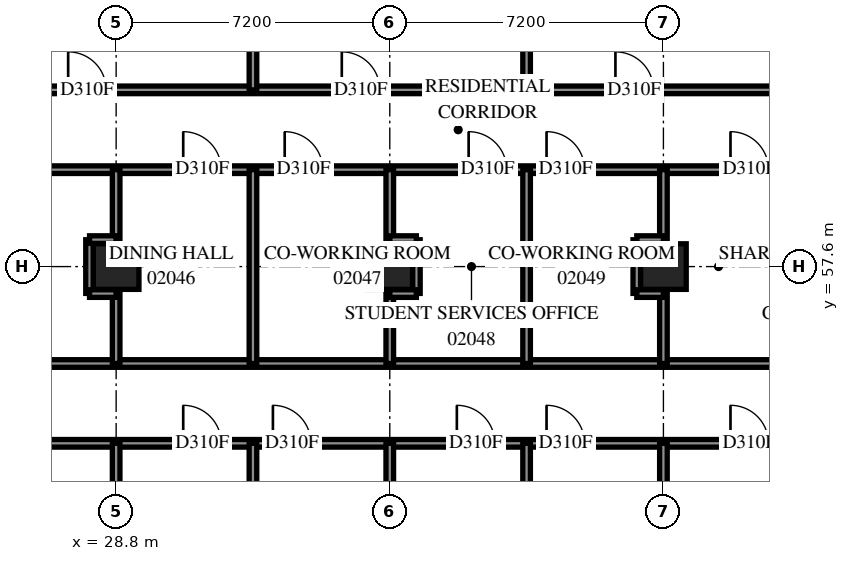
"""IFC4 building model, lengths in metres.
Left out: names, types, materials, properties, quantities, classifications, styles, units other than length and angle.
Written with IfcOpenShell. Run it as: python <this file> out.ifc"""

import sys

from ifc_helpers import new_model, si_unit, direction, frame, frame_2d, origin, origin_2d, place, context, subcontext, project, spatial, rectangle, extrude, element, fill, save


model = new_model("IFC4")
c1 = context("Model", 3, precision=1e-05, world=origin(), true_north=direction((0.0, 1.0)))
c2 = subcontext(c1, "Body", "Model", "MODEL_VIEW")
j1 = project(units=[si_unit("LENGTHUNIT", "METRE"), si_unit("PLANEANGLEUNIT", "RADIAN")], contexts=[c1])
p1 = place(None, origin())
s1 = spatial("IfcSite", under=j1, at=p1, CompositionType="ELEMENT")
p2 = place(p1, origin())
s2 = spatial("IfcBuilding", under=s1, at=p2, CompositionType="ELEMENT")
p3 = place(p2, frame((0.0, 0.0, 10.2)))
s3 = spatial("IfcBuildingStorey", under=s2, at=p3, CompositionType="ELEMENT", Elevation=10.2)
for number, where, z_axis, x_axis in (
    (1, (28.8, 57.6, 0.0), (0.0, 0.0, 1.0), (1.0, 0.0, 0.0)),
    (2, (36.0, 57.6, 0.0), (0.0, 0.0, 1.0), (1.0, 0.0, 0.0)),
    (3, (43.2, 57.6, 0.0), (0.0, 0.0, 1.0), (1.0, 0.0, 0.0)),
):
    element("IfcColumn", number, at=place(p3, frame(where, z_axis=z_axis, x_axis=x_axis)), inside=s3, PredefinedType="COLUMN", context=c2, shape_type="SweptSolid", body=[
        extrude(rectangle(XDim=1.2, YDim=1.2, at=origin_2d()), origin(), (0.0, 0.0, 1.0), 3.8),
    ])
p4 = place(p3, frame((0.0, 55.05, 0.0), z_axis=(0.0, 0.0, 1.0), x_axis=(1.0, 0.0, 0.0)))
e4 = element("IfcWall", 4, at=p4, inside=s3, PredefinedType="PARTITIONING", context=c2, shape_type="SweptSolid", body=[
    extrude(rectangle(XDim=54.5, YDim=0.2, at=frame_2d((27.25, 0.0))), origin(), (0.0, 0.0, 1.0), 3.8),
])
p5 = place(p4, frame((52.452, 0.0, 0.0)))
e5 = element("IfcOpeningElement", 5, at=p5, cuts=e4, PredefinedType="OPENING", context=c2, shape_type="SweptSolid", body=[
    extrude(rectangle(XDim=1.0, YDim=2.1, at=frame_2d((0.5, 1.05))), frame((0.0, 0.11, 0.0), z_axis=(0.0, -1.0, 0.0), x_axis=(1.0, 0.0, 0.0)), (0.0, 0.0, 1.0), 0.22),
])
p6 = place(p4, frame((2.42, 0.0, 0.0)))
e6 = element("IfcOpeningElement", 6, at=p6, cuts=e4, PredefinedType="OPENING", context=c2, shape_type="SweptSolid", body=[
    extrude(rectangle(XDim=1.0, YDim=2.1, at=frame_2d((0.5, 1.05))), frame((0.0, 0.11, 0.0), z_axis=(0.0, -1.0, 0.0), x_axis=(1.0, 0.0, 0.0)), (0.0, 0.0, 1.0), 0.22),
])
p7 = place(p3, frame((0.0, 52.95, 0.0), z_axis=(0.0, 0.0, 1.0), x_axis=(1.0, 0.0, 0.0)))
e7 = element("IfcWall", 7, at=p7, inside=s3, PredefinedType="PARTITIONING", context=c2, shape_type="SweptSolid", body=[
    extrude(rectangle(XDim=54.5, YDim=0.2, at=frame_2d((27.25, 0.0))), origin(), (0.0, 0.0, 1.0), 3.8),
])
p8 = place(p7, frame((8.669, 0.0, 0.0)))
e8 = element("IfcOpeningElement", 8, at=p8, cuts=e7, PredefinedType="OPENING", context=c2, shape_type="SweptSolid", body=[
    extrude(rectangle(XDim=1.0, YDim=2.1, at=frame_2d((0.5, 1.05))), frame((0.0, 0.11, 0.0), z_axis=(0.0, -1.0, 0.0), x_axis=(1.0, 0.0, 0.0)), (0.0, 0.0, 1.0), 0.22),
])
p9 = place(p7, frame((11.307, 0.0, 0.0)))
e9 = element("IfcOpeningElement", 9, at=p9, cuts=e7, PredefinedType="OPENING", context=c2, shape_type="SweptSolid", body=[
    extrude(rectangle(XDim=1.0, YDim=2.1, at=frame_2d((0.5, 1.05))), frame((0.0, 0.11, 0.0), z_axis=(0.0, -1.0, 0.0), x_axis=(1.0, 0.0, 0.0)), (0.0, 0.0, 1.0), 0.22),
])
p10 = place(p7, frame((16.433, 0.0, 0.0)))
e10 = element("IfcOpeningElement", 10, at=p10, cuts=e7, PredefinedType="OPENING", context=c2, shape_type="SweptSolid", body=[
    extrude(rectangle(XDim=1.0, YDim=2.1, at=frame_2d((0.5, 1.05))), frame((0.0, 0.11, 0.0), z_axis=(0.0, -1.0, 0.0), x_axis=(1.0, 0.0, 0.0)), (0.0, 0.0, 1.0), 0.22),
])
p11 = place(p7, frame((22.025, 0.0, 0.0)))
e11 = element("IfcOpeningElement", 11, at=p11, cuts=e7, PredefinedType="OPENING", context=c2, shape_type="SweptSolid", body=[
    extrude(rectangle(XDim=1.0, YDim=2.1, at=frame_2d((0.5, 1.05))), frame((0.0, 0.11, 0.0), z_axis=(0.0, -1.0, 0.0), x_axis=(1.0, 0.0, 0.0)), (0.0, 0.0, 1.0), 0.22),
])
p12 = place(p7, frame((30.565, 0.0, 0.0)))
e12 = element("IfcOpeningElement", 12, at=p12, cuts=e7, PredefinedType="OPENING", context=c2, shape_type="SweptSolid", body=[
    extrude(rectangle(XDim=1.0, YDim=2.1, at=frame_2d((0.5, 1.05))), frame((0.0, 0.11, 0.0), z_axis=(0.0, -1.0, 0.0), x_axis=(1.0, 0.0, 0.0)), (0.0, 0.0, 1.0), 0.22),
])
p13 = place(p7, frame((32.925, 0.0, 0.0)))
e13 = element("IfcOpeningElement", 13, at=p13, cuts=e7, PredefinedType="OPENING", context=c2, shape_type="SweptSolid", body=[
    extrude(rectangle(XDim=1.0, YDim=2.1, at=frame_2d((0.5, 1.05))), frame((0.0, 0.11, 0.0), z_axis=(0.0, -1.0, 0.0), x_axis=(1.0, 0.0, 0.0)), (0.0, 0.0, 1.0), 0.22),
])
p14 = place(p7, frame((37.765, 0.0, 0.0)))
e14 = element("IfcOpeningElement", 14, at=p14, cuts=e7, PredefinedType="OPENING", context=c2, shape_type="SweptSolid", body=[
    extrude(rectangle(XDim=1.0, YDim=2.1, at=frame_2d((0.5, 1.05))), frame((0.0, 0.11, 0.0), z_axis=(0.0, -1.0, 0.0), x_axis=(1.0, 0.0, 0.0)), (0.0, 0.0, 1.0), 0.22),
])
p15 = place(p7, frame((40.125, 0.0, 0.0)))
e15 = element("IfcOpeningElement", 15, at=p15, cuts=e7, PredefinedType="OPENING", context=c2, shape_type="SweptSolid", body=[
    extrude(rectangle(XDim=1.0, YDim=2.1, at=frame_2d((0.5, 1.05))), frame((0.0, 0.11, 0.0), z_axis=(0.0, -1.0, 0.0), x_axis=(1.0, 0.0, 0.0)), (0.0, 0.0, 1.0), 0.22),
])
p16 = place(p7, frame((44.965, 0.0, 0.0)))
e16 = element("IfcOpeningElement", 16, at=p16, cuts=e7, PredefinedType="OPENING", context=c2, shape_type="SweptSolid", body=[
    extrude(rectangle(XDim=1.0, YDim=2.1, at=frame_2d((0.5, 1.05))), frame((0.0, 0.11, 0.0), z_axis=(0.0, -1.0, 0.0), x_axis=(1.0, 0.0, 0.0)), (0.0, 0.0, 1.0), 0.22),
])
p17 = place(p7, frame((47.325, 0.0, 0.0)))
e17 = element("IfcOpeningElement", 17, at=p17, cuts=e7, PredefinedType="OPENING", context=c2, shape_type="SweptSolid", body=[
    extrude(rectangle(XDim=1.0, YDim=2.1, at=frame_2d((0.5, 1.05))), frame((0.0, 0.11, 0.0), z_axis=(0.0, -1.0, 0.0), x_axis=(1.0, 0.0, 0.0)), (0.0, 0.0, 1.0), 0.22),
])
p18 = place(p7, frame((52.165, 0.0, 0.0)))
e18 = element("IfcOpeningElement", 18, at=p18, cuts=e7, PredefinedType="OPENING", context=c2, shape_type="SweptSolid", body=[
    extrude(rectangle(XDim=1.0, YDim=2.1, at=frame_2d((0.5, 1.05))), frame((0.0, 0.11, 0.0), z_axis=(0.0, -1.0, 0.0), x_axis=(1.0, 0.0, 0.0)), (0.0, 0.0, 1.0), 0.22),
])
p19 = place(p7, frame((2.372, 0.0, 0.0)))
e19 = element("IfcOpeningElement", 19, at=p19, cuts=e7, PredefinedType="OPENING", context=c2, shape_type="SweptSolid", body=[
    extrude(rectangle(XDim=1.0, YDim=2.1, at=frame_2d((0.5, 1.05))), frame((0.0, 0.11, 0.0), z_axis=(0.0, -1.0, 0.0), x_axis=(1.0, 0.0, 0.0)), (0.0, 0.0, 1.0), 0.22),
])
p20 = place(p7, frame((4.792, 0.0, 0.0)))
e20 = element("IfcOpeningElement", 20, at=p20, cuts=e7, PredefinedType="OPENING", context=c2, shape_type="SweptSolid", body=[
    extrude(rectangle(XDim=1.0, YDim=2.1, at=frame_2d((0.5, 1.05))), frame((0.0, 0.11, 0.0), z_axis=(0.0, -1.0, 0.0), x_axis=(1.0, 0.0, 0.0)), (0.0, 0.0, 1.0), 0.22),
])
p21 = place(p3, frame((0.002, 60.15, 0.0), z_axis=(0.0, 0.0, 1.0), x_axis=(1.0, 0.0, 0.0)))
e21 = element("IfcWall", 21, at=p21, inside=s3, PredefinedType="PARTITIONING", context=c2, shape_type="SweptSolid", body=[
    extrude(rectangle(XDim=54.498, YDim=0.2, at=frame_2d((27.249, 0.0))), origin(), (0.0, 0.0, 1.0), 3.8),
])
p22 = place(p21, frame((8.667, 0.0, 0.0)))
e22 = element("IfcOpeningElement", 22, at=p22, cuts=e21, PredefinedType="OPENING", context=c2, shape_type="SweptSolid", body=[
    extrude(rectangle(XDim=1.0, YDim=2.1, at=frame_2d((0.5, 1.05))), frame((0.0, 0.11, 0.0), z_axis=(0.0, -1.0, 0.0), x_axis=(1.0, 0.0, 0.0)), (0.0, 0.0, 1.0), 0.22),
])
p23 = place(p21, frame((11.323, 0.0, 0.0)))
e23 = element("IfcOpeningElement", 23, at=p23, cuts=e21, PredefinedType="OPENING", context=c2, shape_type="SweptSolid", body=[
    extrude(rectangle(XDim=1.0, YDim=2.1, at=frame_2d((0.5, 1.05))), frame((0.0, 0.11, 0.0), z_axis=(0.0, -1.0, 0.0), x_axis=(1.0, 0.0, 0.0)), (0.0, 0.0, 1.0), 0.22),
])
p24 = place(p21, frame((16.163, 0.0, 0.0)))
e24 = element("IfcOpeningElement", 24, at=p24, cuts=e21, PredefinedType="OPENING", context=c2, shape_type="SweptSolid", body=[
    extrude(rectangle(XDim=1.0, YDim=2.1, at=frame_2d((0.5, 1.05))), frame((0.0, 0.11, 0.0), z_axis=(0.0, -1.0, 0.0), x_axis=(1.0, 0.0, 0.0)), (0.0, 0.0, 1.0), 0.22),
])
p25 = place(p21, frame((22.14, 0.0, 0.0)))
e25 = element("IfcOpeningElement", 25, at=p25, cuts=e21, PredefinedType="OPENING", context=c2, shape_type="SweptSolid", body=[
    extrude(rectangle(XDim=1.0, YDim=2.1, at=frame_2d((0.5, 1.05))), frame((0.0, 0.11, 0.0), z_axis=(0.0, -1.0, 0.0), x_axis=(1.0, 0.0, 0.0)), (0.0, 0.0, 1.0), 0.22),
])
p26 = place(p21, frame((30.563, 0.0, 0.0)))
e26 = element("IfcOpeningElement", 26, at=p26, cuts=e21, PredefinedType="OPENING", context=c2, shape_type="SweptSolid", body=[
    extrude(rectangle(XDim=1.0, YDim=2.1, at=frame_2d((0.5, 1.05))), frame((0.0, 0.11, 0.0), z_axis=(0.0, -1.0, 0.0), x_axis=(1.0, 0.0, 0.0)), (0.0, 0.0, 1.0), 0.22),
])
p27 = place(p21, frame((33.233, 0.0, 0.0)))
e27 = element("IfcOpeningElement", 27, at=p27, cuts=e21, PredefinedType="OPENING", context=c2, shape_type="SweptSolid", body=[
    extrude(rectangle(XDim=1.0, YDim=2.1, at=frame_2d((0.5, 1.05))), frame((0.0, 0.11, 0.0), z_axis=(0.0, -1.0, 0.0), x_axis=(1.0, 0.0, 0.0)), (0.0, 0.0, 1.0), 0.22),
])
p28 = place(p21, frame((38.073, 0.0, 0.0)))
e28 = element("IfcOpeningElement", 28, at=p28, cuts=e21, PredefinedType="OPENING", context=c2, shape_type="SweptSolid", body=[
    extrude(rectangle(XDim=1.0, YDim=2.1, at=frame_2d((0.5, 1.05))), frame((0.0, 0.11, 0.0), z_axis=(0.0, -1.0, 0.0), x_axis=(1.0, 0.0, 0.0)), (0.0, 0.0, 1.0), 0.22),
])
p29 = place(p21, frame((40.123, 0.0, 0.0)))
e29 = element("IfcOpeningElement", 29, at=p29, cuts=e21, PredefinedType="OPENING", context=c2, shape_type="SweptSolid", body=[
    extrude(rectangle(XDim=1.0, YDim=2.1, at=frame_2d((0.5, 1.05))), frame((0.0, 0.11, 0.0), z_axis=(0.0, -1.0, 0.0), x_axis=(1.0, 0.0, 0.0)), (0.0, 0.0, 1.0), 0.22),
])
p30 = place(p21, frame((44.963, 0.0, 0.0)))
e30 = element("IfcOpeningElement", 30, at=p30, cuts=e21, PredefinedType="OPENING", context=c2, shape_type="SweptSolid", body=[
    extrude(rectangle(XDim=1.0, YDim=2.1, at=frame_2d((0.5, 1.05))), frame((0.0, 0.11, 0.0), z_axis=(0.0, -1.0, 0.0), x_axis=(1.0, 0.0, 0.0)), (0.0, 0.0, 1.0), 0.22),
])
p31 = place(p21, frame((47.323, 0.0, 0.0)))
e31 = element("IfcOpeningElement", 31, at=p31, cuts=e21, PredefinedType="OPENING", context=c2, shape_type="SweptSolid", body=[
    extrude(rectangle(XDim=1.0, YDim=2.1, at=frame_2d((0.5, 1.05))), frame((0.0, 0.11, 0.0), z_axis=(0.0, -1.0, 0.0), x_axis=(1.0, 0.0, 0.0)), (0.0, 0.0, 1.0), 0.22),
])
p32 = place(p21, frame((3.747, 0.0, 0.0)))
e32 = element("IfcOpeningElement", 32, at=p32, cuts=e21, PredefinedType="OPENING", context=c2, shape_type="SweptSolid", body=[
    extrude(rectangle(XDim=1.0, YDim=2.1, at=frame_2d((0.5, 1.05))), frame((0.0, 0.11, 0.0), z_axis=(0.0, -1.0, 0.0), x_axis=(1.0, 0.0, 0.0)), (0.0, 0.0, 1.0), 0.22),
])
p33 = place(p3, frame((0.002, 62.25, 0.0), z_axis=(0.0, 0.0, 1.0), x_axis=(1.0, 0.0, 0.0)))
e33 = element("IfcWall", 33, at=p33, inside=s3, PredefinedType="PARTITIONING", context=c2, shape_type="SweptSolid", body=[
    extrude(rectangle(XDim=54.498, YDim=0.2, at=frame_2d((27.249, 0.0))), origin(), (0.0, 0.0, 1.0), 3.8),
])
p34 = place(p33, frame((8.667, 0.0, 0.0)))
e34 = element("IfcOpeningElement", 34, at=p34, cuts=e33, PredefinedType="OPENING", context=c2, shape_type="SweptSolid", body=[
    extrude(rectangle(XDim=1.0, YDim=2.1, at=frame_2d((0.5, 1.05))), frame((0.0, 0.11, 0.0), z_axis=(0.0, -1.0, 0.0), x_axis=(1.0, 0.0, 0.0)), (0.0, 0.0, 1.0), 0.22),
])
p35 = place(p33, frame((13.136, 0.0, 0.0)))
e35 = element("IfcOpeningElement", 35, at=p35, cuts=e33, PredefinedType="OPENING", context=c2, shape_type="SweptSolid", body=[
    extrude(rectangle(XDim=1.0, YDim=2.1, at=frame_2d((0.5, 1.05))), frame((0.0, 0.11, 0.0), z_axis=(0.0, -1.0, 0.0), x_axis=(1.0, 0.0, 0.0)), (0.0, 0.0, 1.0), 0.22),
])
p36 = place(p33, frame((20.335, 0.0, 0.0)))
e36 = element("IfcOpeningElement", 36, at=p36, cuts=e33, PredefinedType="OPENING", context=c2, shape_type="SweptSolid", body=[
    extrude(rectangle(XDim=1.0, YDim=2.1, at=frame_2d((0.5, 1.05))), frame((0.0, 0.11, 0.0), z_axis=(0.0, -1.0, 0.0), x_axis=(1.0, 0.0, 0.0)), (0.0, 0.0, 1.0), 0.22),
])
p37 = place(p33, frame((27.535, 0.0, 0.0)))
e37 = element("IfcOpeningElement", 37, at=p37, cuts=e33, PredefinedType="OPENING", context=c2, shape_type="SweptSolid", body=[
    extrude(rectangle(XDim=1.0, YDim=2.1, at=frame_2d((0.5, 1.05))), frame((0.0, 0.11, 0.0), z_axis=(0.0, -1.0, 0.0), x_axis=(1.0, 0.0, 0.0)), (0.0, 0.0, 1.0), 0.22),
])
p38 = place(p33, frame((34.736, 0.0, 0.0)))
e38 = element("IfcOpeningElement", 38, at=p38, cuts=e33, PredefinedType="OPENING", context=c2, shape_type="SweptSolid", body=[
    extrude(rectangle(XDim=1.0, YDim=2.1, at=frame_2d((0.5, 1.05))), frame((0.0, 0.11, 0.0), z_axis=(0.0, -1.0, 0.0), x_axis=(1.0, 0.0, 0.0)), (0.0, 0.0, 1.0), 0.22),
])
p39 = place(p33, frame((41.935, 0.0, 0.0)))
e39 = element("IfcOpeningElement", 39, at=p39, cuts=e33, PredefinedType="OPENING", context=c2, shape_type="SweptSolid", body=[
    extrude(rectangle(XDim=1.0, YDim=2.1, at=frame_2d((0.5, 1.05))), frame((0.0, 0.11, 0.0), z_axis=(0.0, -1.0, 0.0), x_axis=(1.0, 0.0, 0.0)), (0.0, 0.0, 1.0), 0.22),
])
p40 = place(p33, frame((49.136, 0.0, 0.0)))
e40 = element("IfcOpeningElement", 40, at=p40, cuts=e33, PredefinedType="OPENING", context=c2, shape_type="SweptSolid", body=[
    extrude(rectangle(XDim=1.0, YDim=2.1, at=frame_2d((0.5, 1.05))), frame((0.0, 0.11, 0.0), z_axis=(0.0, -1.0, 0.0), x_axis=(1.0, 0.0, 0.0)), (0.0, 0.0, 1.0), 0.22),
])
p41 = place(p33, frame((4.799, 0.0, 0.0)))
e41 = element("IfcOpeningElement", 41, at=p41, cuts=e33, PredefinedType="OPENING", context=c2, shape_type="SweptSolid", body=[
    extrude(rectangle(XDim=1.0, YDim=2.1, at=frame_2d((0.5, 1.05))), frame((0.0, 0.11, 0.0), z_axis=(0.0, -1.0, 0.0), x_axis=(1.0, 0.0, 0.0)), (0.0, 0.0, 1.0), 0.22),
])
for number, where, z_axis, x_axis in (
    (42, (32.4, 42.0, 0.0), (0.0, 0.0, 1.0), (0.0, 1.0, 0.0)),
    (43, (39.6, 42.0, 0.0), (0.0, 0.0, 1.0), (0.0, 1.0, 0.0)),
):
    element("IfcWall", number, at=place(p3, frame(where, z_axis=z_axis, x_axis=x_axis)), inside=s3, PredefinedType="PARTITIONING", context=c2, shape_type="SweptSolid", body=[
        extrude(rectangle(XDim=10.95, YDim=0.2, at=frame_2d((5.475, 0.0))), origin(), (0.0, 0.0, 1.0), 3.8),
    ])
for number, where, z_axis, x_axis in (
    (44, (32.4, 62.25, 0.0), (0.0, 0.0, 1.0), (0.0, 1.0, 0.0)),
    (45, (39.6, 62.25, 0.0), (0.0, 0.0, 1.0), (0.0, 1.0, 0.0)),
):
    element("IfcWall", number, at=place(p3, frame(where, z_axis=z_axis, x_axis=x_axis)), inside=s3, PredefinedType="PARTITIONING", context=c2, shape_type="SweptSolid", body=[
        extrude(rectangle(XDim=10.4, YDim=0.2, at=frame_2d((5.2, 0.0))), origin(), (0.0, 0.0, 1.0), 3.8),
    ])
for number, where, z_axis, x_axis in (
    (46, (32.4, 55.05, 0.0), (0.0, 0.0, 1.0), (0.0, 1.0, 0.0)),
    (47, (39.6, 55.05, 0.0), (0.0, 0.0, 1.0), (0.0, 1.0, 0.0)),
):
    element("IfcWall", number, at=place(p3, frame(where, z_axis=z_axis, x_axis=x_axis)), inside=s3, PredefinedType="PARTITIONING", context=c2, shape_type="SweptSolid", body=[
        extrude(rectangle(XDim=5.1, YDim=0.2, at=frame_2d((2.55, 0.0))), origin(), (0.0, 0.0, 1.0), 3.8),
    ])
for number, where, z_axis, x_axis in (
    (48, (28.8, 51.106, 0.0), (0.0, 0.0, 1.0), (0.0, 1.0, 0.0)),
    (49, (28.8, 55.05, 0.0), (0.0, 0.0, 1.0), (0.0, 1.0, 0.0)),
    (50, (28.8, 58.306, 0.0), (0.0, 0.0, 1.0), (0.0, 1.0, 0.0)),
    (51, (36.0, 51.106, 0.0), (0.0, 0.0, 1.0), (0.0, 1.0, 0.0)),
    (52, (36.0, 55.05, 0.0), (0.0, 0.0, 1.0), (0.0, 1.0, 0.0)),
    (53, (36.0, 58.306, 0.0), (0.0, 0.0, 1.0), (0.0, 1.0, 0.0)),
    (54, (43.2, 51.106, 0.0), (0.0, 0.0, 1.0), (0.0, 1.0, 0.0)),
    (55, (43.2, 55.05, 0.0), (0.0, 0.0, 1.0), (0.0, 1.0, 0.0)),
    (56, (43.2, 58.306, 0.0), (0.0, 0.0, 1.0), (0.0, 1.0, 0.0)),
):
    element("IfcWall", number, at=place(p3, frame(where, z_axis=z_axis, x_axis=x_axis)), inside=s3, PredefinedType="PARTITIONING", context=c2, shape_type="SweptSolid", body=[
        extrude(rectangle(XDim=1.844, YDim=0.2, at=frame_2d((0.922, 0.0))), origin(), (0.0, 0.0, 1.0), 3.8),
    ])
for number, where, z_axis, x_axis in (
    (57, (28.1, 56.894, 0.0), (0.0, 0.0, 1.0), (0.0, 1.0, 0.0)),
    (58, (36.7, 56.894, 0.0), (0.0, 0.0, 1.0), (0.0, 1.0, 0.0)),
    (59, (42.5, 56.894, 0.0), (0.0, 0.0, 1.0), (0.0, 1.0, 0.0)),
):
    element("IfcWall", number, at=place(p3, frame(where, z_axis=z_axis, x_axis=x_axis)), inside=s3, PredefinedType="PARTITIONING", context=c2, shape_type="SweptSolid", body=[
        extrude(rectangle(XDim=1.412, YDim=0.2, at=frame_2d((0.706, 0.0))), origin(), (0.0, 0.0, 1.0), 3.8),
    ])
for number, where, z_axis, x_axis in (
    (60, (36.0, 58.31, 0.0), (0.0, 0.0, 1.0), (1.0, 0.0, 0.0)),
    (61, (42.5, 58.31, 0.0), (0.0, 0.0, 1.0), (1.0, 0.0, 0.0)),
    (62, (36.0, 56.89, 0.0), (0.0, 0.0, 1.0), (1.0, 0.0, 0.0)),
    (63, (42.5, 56.89, 0.0), (0.0, 0.0, 1.0), (1.0, 0.0, 0.0)),
    (64, (28.1, 58.31, 0.0), (0.0, 0.0, 1.0), (1.0, 0.0, 0.0)),
    (65, (28.1, 56.89, 0.0), (0.0, 0.0, 1.0), (1.0, 0.0, 0.0)),
):
    element("IfcWall", number, at=place(p3, frame(where, z_axis=z_axis, x_axis=x_axis)), inside=s3, PredefinedType="PARTITIONING", context=c2, shape_type="SweptSolid", body=[
        extrude(rectangle(XDim=0.7, YDim=0.2, at=frame_2d((0.35, 0.0))), origin(), (0.0, 0.0, 1.0), 3.8),
    ])
p42 = place(p12, origin())
e66 = element("IfcDoor", 66, at=p42, inside=s3, OperationType="SINGLE_SWING_LEFT", PredefinedType="DOOR", context=c2, shape_type="SweptSolid", body=[
    extrude(rectangle(XDim=1.0, YDim=2.1, at=frame_2d((0.5, 1.05))), frame((0.0, 0.025, 0.0), z_axis=(0.0, -1.0, 0.0), x_axis=(1.0, 0.0, 0.0)), (0.0, 0.0, 1.0), 0.05),
])
fill(e12, e66)
p43 = place(p13, origin())
e67 = element("IfcDoor", 67, at=p43, inside=s3, OperationType="SINGLE_SWING_RIGHT", PredefinedType="DOOR", context=c2, shape_type="SweptSolid", body=[
    extrude(rectangle(XDim=1.0, YDim=2.1, at=frame_2d((0.5, 1.05))), frame((0.0, 0.025, 0.0), z_axis=(0.0, -1.0, 0.0), x_axis=(1.0, 0.0, 0.0)), (0.0, 0.0, 1.0), 0.05),
])
fill(e13, e67)
p44 = place(p14, origin())
e68 = element("IfcDoor", 68, at=p44, inside=s3, OperationType="SINGLE_SWING_LEFT", PredefinedType="DOOR", context=c2, shape_type="SweptSolid", body=[
    extrude(rectangle(XDim=1.0, YDim=2.1, at=frame_2d((0.5, 1.05))), frame((0.0, 0.025, 0.0), z_axis=(0.0, -1.0, 0.0), x_axis=(1.0, 0.0, 0.0)), (0.0, 0.0, 1.0), 0.05),
])
fill(e14, e68)
p45 = place(p15, origin())
e69 = element("IfcDoor", 69, at=p45, inside=s3, OperationType="SINGLE_SWING_RIGHT", PredefinedType="DOOR", context=c2, shape_type="SweptSolid", body=[
    extrude(rectangle(XDim=1.0, YDim=2.1, at=frame_2d((0.5, 1.05))), frame((0.0, 0.025, 0.0), z_axis=(0.0, -1.0, 0.0), x_axis=(1.0, 0.0, 0.0)), (0.0, 0.0, 1.0), 0.05),
])
fill(e15, e69)
p46 = place(p16, origin())
e70 = element("IfcDoor", 70, at=p46, inside=s3, OperationType="SINGLE_SWING_LEFT", PredefinedType="DOOR", context=c2, shape_type="SweptSolid", body=[
    extrude(rectangle(XDim=1.0, YDim=2.1, at=frame_2d((0.5, 1.05))), frame((0.0, 0.025, 0.0), z_axis=(0.0, -1.0, 0.0), x_axis=(1.0, 0.0, 0.0)), (0.0, 0.0, 1.0), 0.05),
])
fill(e16, e70)
p47 = place(p26, origin())
e71 = element("IfcDoor", 71, at=p47, inside=s3, OperationType="SINGLE_SWING_LEFT", PredefinedType="DOOR", context=c2, shape_type="SweptSolid", body=[
    extrude(rectangle(XDim=1.0, YDim=2.1, at=frame_2d((0.5, 1.05))), frame((0.0, 0.025, 0.0), z_axis=(0.0, -1.0, 0.0), x_axis=(1.0, 0.0, 0.0)), (0.0, 0.0, 1.0), 0.05),
])
fill(e26, e71)
p48 = place(p27, origin())
e72 = element("IfcDoor", 72, at=p48, inside=s3, OperationType="SINGLE_SWING_RIGHT", PredefinedType="DOOR", context=c2, shape_type="SweptSolid", body=[
    extrude(rectangle(XDim=1.0, YDim=2.1, at=frame_2d((0.5, 1.05))), frame((0.0, 0.025, 0.0), z_axis=(0.0, -1.0, 0.0), x_axis=(1.0, 0.0, 0.0)), (0.0, 0.0, 1.0), 0.05),
])
fill(e27, e72)
p49 = place(p28, origin())
e73 = element("IfcDoor", 73, at=p49, inside=s3, OperationType="SINGLE_SWING_LEFT", PredefinedType="DOOR", context=c2, shape_type="SweptSolid", body=[
    extrude(rectangle(XDim=1.0, YDim=2.1, at=frame_2d((0.5, 1.05))), frame((0.0, 0.025, 0.0), z_axis=(0.0, -1.0, 0.0), x_axis=(1.0, 0.0, 0.0)), (0.0, 0.0, 1.0), 0.05),
])
fill(e28, e73)
p50 = place(p29, origin())
e74 = element("IfcDoor", 74, at=p50, inside=s3, OperationType="SINGLE_SWING_RIGHT", PredefinedType="DOOR", context=c2, shape_type="SweptSolid", body=[
    extrude(rectangle(XDim=1.0, YDim=2.1, at=frame_2d((0.5, 1.05))), frame((0.0, 0.025, 0.0), z_axis=(0.0, -1.0, 0.0), x_axis=(1.0, 0.0, 0.0)), (0.0, 0.0, 1.0), 0.05),
])
fill(e29, e74)
p51 = place(p30, origin())
e75 = element("IfcDoor", 75, at=p51, inside=s3, OperationType="SINGLE_SWING_LEFT", PredefinedType="DOOR", context=c2, shape_type="SweptSolid", body=[
    extrude(rectangle(XDim=1.0, YDim=2.1, at=frame_2d((0.5, 1.05))), frame((0.0, 0.025, 0.0), z_axis=(0.0, -1.0, 0.0), x_axis=(1.0, 0.0, 0.0)), (0.0, 0.0, 1.0), 0.05),
])
fill(e30, e75)
p52 = place(p37, origin())
e76 = element("IfcDoor", 76, at=p52, inside=s3, OperationType="SINGLE_SWING_LEFT", PredefinedType="DOOR", context=c2, shape_type="SweptSolid", body=[
    extrude(rectangle(XDim=1.0, YDim=2.1, at=frame_2d((0.5, 1.05))), frame((0.0, 0.025, 0.0), z_axis=(0.0, -1.0, 0.0), x_axis=(1.0, 0.0, 0.0)), (0.0, 0.0, 1.0), 0.05),
])
fill(e37, e76)
p53 = place(p38, origin())
e77 = element("IfcDoor", 77, at=p53, inside=s3, OperationType="SINGLE_SWING_LEFT", PredefinedType="DOOR", context=c2, shape_type="SweptSolid", body=[
    extrude(rectangle(XDim=1.0, YDim=2.1, at=frame_2d((0.5, 1.05))), frame((0.0, 0.025, 0.0), z_axis=(0.0, -1.0, 0.0), x_axis=(1.0, 0.0, 0.0)), (0.0, 0.0, 1.0), 0.05),
])
fill(e38, e77)
p54 = place(p39, origin())
e78 = element("IfcDoor", 78, at=p54, inside=s3, OperationType="SINGLE_SWING_LEFT", PredefinedType="DOOR", context=c2, shape_type="SweptSolid", body=[
    extrude(rectangle(XDim=1.0, YDim=2.1, at=frame_2d((0.5, 1.05))), frame((0.0, 0.025, 0.0), z_axis=(0.0, -1.0, 0.0), x_axis=(1.0, 0.0, 0.0)), (0.0, 0.0, 1.0), 0.05),
])
fill(e39, e78)
save(model, sys.argv[1])
